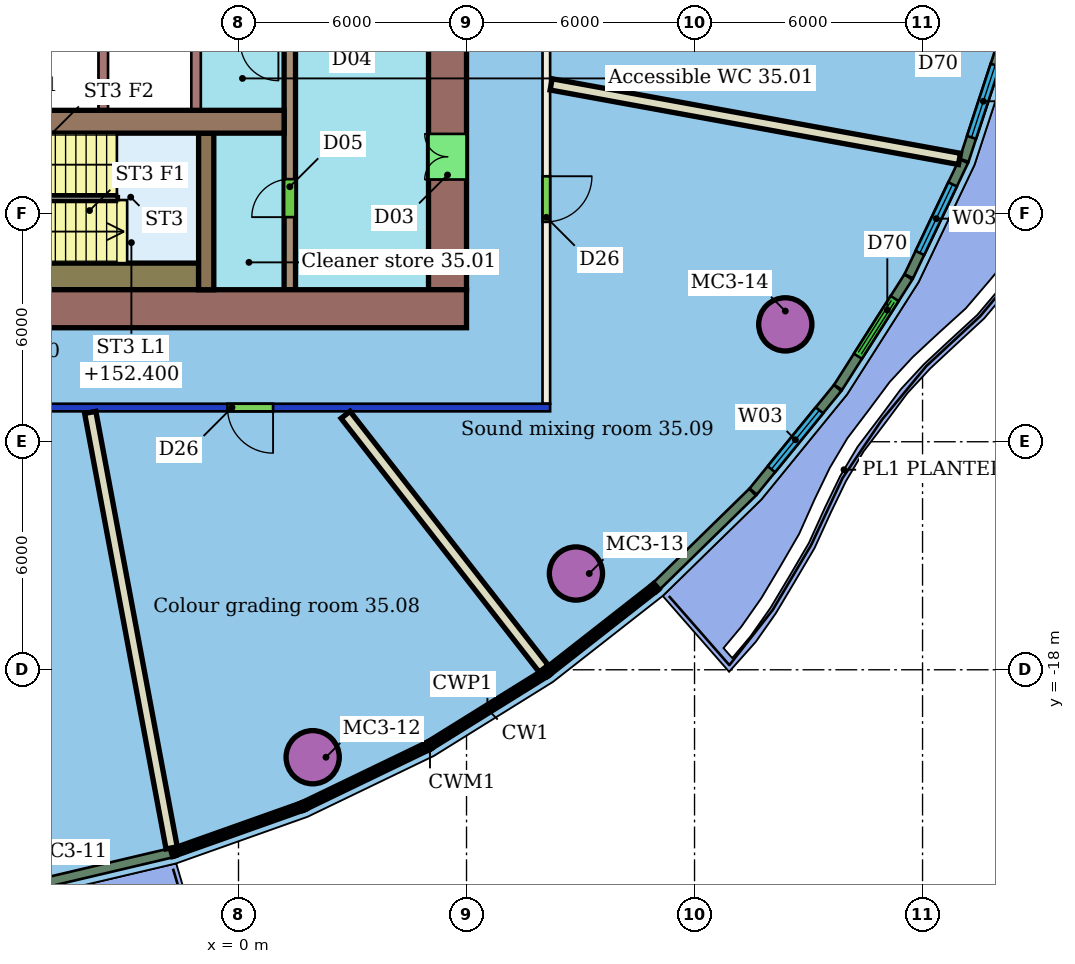
"""IFC4 building model, lengths in metres.
Left out: names, types, materials, properties, quantities, classifications, styles, units other than length and angle.
Written with IfcOpenShell. Run it as: python <this file> out.ifc"""

import sys

from ifc_helpers import new_model, si_unit, direction, frame, frame_2d, origin, origin_2d, place, context, subcontext, project, spatial, rectangle, hollow_circle, extrude, element, fill, save


model = new_model("IFC4")
c1 = context("Model", 3, precision=1e-05, world=origin(), true_north=direction((0.0, 1.0)))
c2 = subcontext(c1, "Body", "Model", "MODEL_VIEW")
j1 = project(units=[si_unit("LENGTHUNIT", "METRE"), si_unit("PLANEANGLEUNIT", "RADIAN")], contexts=[c1])
p1 = place(None, origin())
s1 = spatial("IfcSite", under=j1, at=p1, CompositionType="ELEMENT")
p2 = place(p1, origin())
s2 = spatial("IfcBuilding", under=s1, at=p2, CompositionType="ELEMENT")
p3 = place(p2, frame((0.0, 0.0, 150.6)))
s3 = spatial("IfcBuildingStorey", under=s2, at=p3, CompositionType="ELEMENT", Elevation=150.6)
for number, where, z_axis, x_axis in (
    (1, (1.952, -20.301, 0.0), (0.0, 0.0, 1.0), (1.0, 0.0, 0.0)),
    (2, (8.879, -15.467, 0.0), (0.0, 0.0, 1.0), (1.0, 0.0, 0.0)),
    (3, (14.388, -8.912, 0.0), (0.0, 0.0, 1.0), (1.0, 0.0, 0.0)),
):
    element("IfcColumn", number, at=place(p3, frame(where, z_axis=z_axis, x_axis=x_axis)), inside=s3, PredefinedType="COLUMN", context=c2, shape_type="SweptSolid", body=[
        extrude(hollow_circle(Radius=0.7, WallThickness=0.05, at=origin_2d()), origin(), (0.0, 0.0, 1.0), 3.45),
    ])
p4 = place(p3, frame((8.2, -11.1, 0.0), z_axis=(0.0, 0.0, 1.0), x_axis=(-1.0, 0.0, 0.0)))
e4 = element("IfcWall", 4, at=p4, inside=s3, PredefinedType="PARTITIONING", context=c2, shape_type="SweptSolid", body=[
    extrude(rectangle(XDim=28.4, YDim=0.2, at=frame_2d((14.2, 0.0))), origin(), (0.0, 0.0, 1.0), 3.05),
])
p5 = place(p4, frame((22.505, 0.0, 0.0)))
e5 = element("IfcOpeningElement", 5, at=p5, cuts=e4, PredefinedType="OPENING", context=c2, shape_type="SweptSolid", body=[
    extrude(rectangle(XDim=1.8, YDim=2.1, at=frame_2d((0.9, 1.05))), frame((0.0, 0.11, 0.0), z_axis=(0.0, -1.0, 0.0), x_axis=(1.0, 0.0, 0.0)), (0.0, 0.0, 1.0), 0.22),
])
p6 = place(p4, frame((17.127, 0.0, 0.0)))
e6 = element("IfcOpeningElement", 6, at=p6, cuts=e4, PredefinedType="OPENING", context=c2, shape_type="SweptSolid", body=[
    extrude(rectangle(XDim=0.9, YDim=2.1, at=frame_2d((0.45, 1.05))), frame((0.0, 0.11, 0.0), z_axis=(0.0, -1.0, 0.0), x_axis=(1.0, 0.0, 0.0)), (0.0, 0.0, 1.0), 0.22),
])
p7 = place(p4, frame((7.291, 0.0, 0.0)))
e7 = element("IfcOpeningElement", 7, at=p7, cuts=e4, PredefinedType="OPENING", context=c2, shape_type="SweptSolid", body=[
    extrude(rectangle(XDim=1.2, YDim=2.1, at=frame_2d((0.6, 1.05))), frame((0.0, 0.11, 0.0), z_axis=(0.0, -1.0, 0.0), x_axis=(1.0, 0.0, 0.0)), (0.0, 0.0, 1.0), 0.22),
])
p8 = place(p3, frame((8.1, 11.0, 0.0), z_axis=(0.0, 0.0, 1.0), x_axis=(0.0, -1.0, 0.0)))
e8 = element("IfcWall", 8, at=p8, inside=s3, PredefinedType="PARTITIONING", context=c2, shape_type="SweptSolid", body=[
    extrude(rectangle(XDim=22.0, YDim=0.2, at=frame_2d((11.0, 0.0))), origin(), (0.0, 0.0, 1.0), 3.45),
])
p9 = place(p8, frame((16.014, 0.0, 0.0)))
e9 = element("IfcOpeningElement", 9, at=p9, cuts=e8, PredefinedType="OPENING", context=c2, shape_type="SweptSolid", body=[
    extrude(rectangle(XDim=1.2, YDim=2.1, at=frame_2d((0.6, 1.05))), frame((0.0, 0.11, 0.0), z_axis=(0.0, -1.0, 0.0), x_axis=(1.0, 0.0, 0.0)), (0.0, 0.0, 1.0), 0.22),
])
p10 = place(p8, frame((8.381, 0.0, 0.0)))
e10 = element("IfcOpeningElement", 10, at=p10, cuts=e8, PredefinedType="OPENING", context=c2, shape_type="SweptSolid", body=[
    extrude(rectangle(XDim=1.8, YDim=2.1, at=frame_2d((0.9, 1.05))), frame((0.0, 0.11, 0.0), z_axis=(0.0, -1.0, 0.0), x_axis=(1.0, 0.0, 0.0)), (0.0, 0.0, 1.0), 0.22),
])
p11 = place(p3, frame((-1.759, -22.687, 0.0), z_axis=(0.0, 0.0, 1.0), x_axis=(-0.183744806011, 0.982973980461, 0.0)))
e11 = element("IfcWall", 11, at=p11, inside=s3, PredefinedType="PARTITIONING", context=c2, shape_type="SweptSolid", body=[
    extrude(rectangle(XDim=11.658, YDim=0.3, at=frame_2d((5.829, 0.0))), origin(), (0.0, 0.0, 1.0), 3.45),
])
p12 = place(p3, frame((8.031, -17.97, 0.0), z_axis=(0.0, 0.0, 1.0), x_axis=(-0.615415856826, 0.788202590181, 0.0)))
e12 = element("IfcWall", 12, at=p12, inside=s3, PredefinedType="PARTITIONING", context=c2, shape_type="SweptSolid", body=[
    extrude(rectangle(XDim=8.472, YDim=0.3, at=frame_2d((4.236, 0.0))), origin(), (0.0, 0.0, 1.0), 3.45),
])
p13 = place(p3, frame((18.972, -4.558, 0.0), z_axis=(0.0, 0.0, 1.0), x_axis=(-0.983747727231, 0.179556144892, 0.0)))
e13 = element("IfcWall", 13, at=p13, inside=s3, PredefinedType="PARTITIONING", context=c2, shape_type="SweptSolid", body=[
    extrude(rectangle(XDim=10.922, YDim=0.3, at=frame_2d((5.461, 0.0))), origin(), (0.0, 0.0, 1.0), 3.45),
])
p14 = place(p3, frame((-5.213, -23.629, 0.0), z_axis=(0.0, 0.0, 1.0), x_axis=(0.973349080419, 0.229328514683, 0.0)))
e14 = element("IfcWall", 14, at=p14, inside=s3, PredefinedType="SOLIDWALL", context=c2, shape_type="SweptSolid", body=[
    extrude(rectangle(XDim=3.529, YDim=0.25, at=frame_2d((1.765, 0.0))), origin(), (0.0, 0.0, 1.0), 3.1),
])
p15 = place(p3, frame((11.005, -15.792, 0.0), z_axis=(0.0, 0.0, 1.0), x_axis=(0.715154193922, 0.698966722324, 0.0)))
e15 = element("IfcWall", 15, at=p15, inside=s3, PredefinedType="SOLIDWALL", context=c2, shape_type="SweptSolid", body=[
    extrude(rectangle(XDim=3.529, YDim=0.25, at=frame_2d((1.765, 0.0))), origin(), (0.0, 0.0, 1.0), 3.1),
])
p16 = place(p3, frame((13.543, -13.31, 0.0), z_axis=(0.0, 0.0, 1.0), x_axis=(0.631962066668, 0.774999320188, 0.0)))
e16 = element("IfcWall", 16, at=p16, inside=s3, PredefinedType="SOLIDWALL", context=c2, shape_type="SweptSolid", body=[
    extrude(rectangle(XDim=3.514, YDim=0.25, at=frame_2d((1.757, 0.0))), origin(), (0.0, 0.0, 1.0), 3.1),
])
p17 = place(p16, frame((0.757, 0.0, 0.9)))
e17 = element("IfcOpeningElement", 17, at=p17, cuts=e16, PredefinedType="OPENING", context=c2, shape_type="SweptSolid", body=[
    extrude(rectangle(XDim=2.0, YDim=2.1, at=frame_2d((1.0, 1.05))), frame((0.0, 0.135, 0.0), z_axis=(0.0, -1.0, 0.0), x_axis=(1.0, 0.0, 0.0)), (0.0, 0.0, 1.0), 0.27),
])
p18 = place(p3, frame((15.778, -10.568, 0.0), z_axis=(0.0, 0.0, 1.0), x_axis=(0.537256497047, 0.843418909191, 0.0)))
e18 = element("IfcWall", 18, at=p18, inside=s3, PredefinedType="SOLIDWALL", context=c2, shape_type="SweptSolid", body=[
    extrude(rectangle(XDim=3.441, YDim=0.25, at=frame_2d((1.72, 0.0))), origin(), (0.0, 0.0, 1.0), 3.1),
])
p19 = place(p18, frame((0.97, 0.0, 0.0)))
e19 = element("IfcOpeningElement", 19, at=p19, cuts=e18, PredefinedType="OPENING", context=c2, shape_type="SweptSolid", body=[
    extrude(rectangle(XDim=1.8, YDim=2.4, at=frame_2d((0.9, 1.2))), frame((0.0, 0.135, 0.0), z_axis=(0.0, -1.0, 0.0), x_axis=(1.0, 0.0, 0.0)), (0.0, 0.0, 1.0), 0.27),
])
p20 = place(p3, frame((17.638, -7.645, 0.0), z_axis=(0.0, 0.0, 1.0), x_axis=(0.430495314567, 0.902592811923, 0.0)))
e20 = element("IfcWall", 20, at=p20, inside=s3, PredefinedType="SOLIDWALL", context=c2, shape_type="SweptSolid", body=[
    extrude(rectangle(XDim=3.357, YDim=0.25, at=frame_2d((1.678, 0.0))), origin(), (0.0, 0.0, 1.0), 3.1),
])
p21 = place(p20, frame((0.678, 0.0, 0.9)))
e21 = element("IfcOpeningElement", 21, at=p21, cuts=e20, PredefinedType="OPENING", context=c2, shape_type="SweptSolid", body=[
    extrude(rectangle(XDim=2.0, YDim=2.1, at=frame_2d((1.0, 1.05))), frame((0.0, 0.135, 0.0), z_axis=(0.0, -1.0, 0.0), x_axis=(1.0, 0.0, 0.0)), (0.0, 0.0, 1.0), 0.27),
])
p22 = place(p3, frame((19.092, -4.593, 0.0), z_axis=(0.0, 0.0, 1.0), x_axis=(0.311426794422, 0.950270146704, 0.0)))
e22 = element("IfcWall", 22, at=p22, inside=s3, PredefinedType="SOLIDWALL", context=c2, shape_type="SweptSolid", body=[
    extrude(rectangle(XDim=3.268, YDim=0.25, at=frame_2d((1.634, 0.0))), origin(), (0.0, 0.0, 1.0), 3.1),
])
p23 = place(p22, frame((0.634, 0.0, 0.9)))
e23 = element("IfcOpeningElement", 23, at=p23, cuts=e22, PredefinedType="OPENING", context=c2, shape_type="SweptSolid", body=[
    extrude(rectangle(XDim=2.0, YDim=2.1, at=frame_2d((1.0, 1.05))), frame((0.0, 0.135, 0.0), z_axis=(0.0, -1.0, 0.0), x_axis=(1.0, 0.0, 0.0)), (0.0, 0.0, 1.0), 0.27),
])
p24 = place(p3, frame((-18.0, -8.5, 0.0), z_axis=(0.0, 0.0, 1.0), x_axis=(1.0, 0.0, 0.0)))
e24 = element("IfcWall", 24, at=p24, inside=s3, PredefinedType="SHEAR", context=c2, shape_type="SweptSolid", body=[
    extrude(rectangle(XDim=24.0, YDim=1.0, at=frame_2d((12.0, 0.0))), origin(), (0.0, 0.0, 1.0), 3.3),
])
p25 = place(p24, frame((6.0, 0.0, 0.0)))
e25 = element("IfcOpeningElement", 25, at=p25, cuts=e24, PredefinedType="OPENING", context=c2, shape_type="SweptSolid", body=[
    extrude(rectangle(XDim=1.2, YDim=2.1, at=frame_2d((0.6, 1.05))), frame((0.0, 0.51, 0.0), z_axis=(0.0, -1.0, 0.0), x_axis=(1.0, 0.0, 0.0)), (0.0, 0.0, 1.0), 1.02),
])
p26 = place(p3, frame((5.5, -8.0, 0.0), z_axis=(0.0, 0.0, 1.0), x_axis=(0.0, 1.0, 0.0)))
e26 = element("IfcWall", 26, at=p26, inside=s3, PredefinedType="SHEAR", context=c2, shape_type="SweptSolid", body=[
    extrude(rectangle(XDim=16.0, YDim=1.0, at=frame_2d((8.0, 0.0))), origin(), (0.0, 0.0, 1.0), 3.3),
])
p27 = place(p26, frame((2.9, 0.0, 0.0)))
e27 = element("IfcOpeningElement", 27, at=p27, cuts=e26, PredefinedType="OPENING", context=c2, shape_type="SweptSolid", body=[
    extrude(rectangle(XDim=1.2, YDim=2.1, at=frame_2d((0.6, 1.05))), frame((0.0, 0.51, 0.0), z_axis=(0.0, -1.0, 0.0), x_axis=(1.0, 0.0, 0.0)), (0.0, 0.0, 1.0), 1.02),
])
p28 = place(p26, frame((11.9, 0.0, 0.0)))
e28 = element("IfcOpeningElement", 28, at=p28, cuts=e26, PredefinedType="OPENING", context=c2, shape_type="SweptSolid", body=[
    extrude(rectangle(XDim=1.2, YDim=2.1, at=frame_2d((0.6, 1.05))), frame((0.0, 0.51, 0.0), z_axis=(0.0, -1.0, 0.0), x_axis=(1.0, 0.0, 0.0)), (0.0, 0.0, 1.0), 1.02),
])
p29 = place(p3, frame((-6.0, -3.58, 0.0), z_axis=(0.0, 0.0, 1.0), x_axis=(1.0, 0.0, 0.0)))
e29 = element("IfcWall", 29, at=p29, inside=s3, PredefinedType="SHEAR", context=c2, shape_type="SweptSolid", body=[
    extrude(rectangle(XDim=7.2, YDim=0.6, at=frame_2d((3.6, 0.0))), origin(), (0.0, 0.0, 1.0), 3.3),
])
p30 = place(p3, frame((1.35, -8.0, 0.0), z_axis=(0.0, 0.0, 1.0), x_axis=(0.0, 1.0, 0.0)))
e30 = element("IfcWall", 30, at=p30, inside=s3, PredefinedType="SHEAR", context=c2, shape_type="SweptSolid", body=[
    extrude(rectangle(XDim=16.0, YDim=0.3, at=frame_2d((8.0, 0.0))), origin(), (0.0, 0.0, 1.0), 3.3),
])
p31 = place(p30, frame((1.91, 0.0, 0.0)))
e31 = element("IfcOpeningElement", 31, at=p31, cuts=e30, PredefinedType="OPENING", context=c2, shape_type="SweptSolid", body=[
    extrude(rectangle(XDim=1.0, YDim=2.1, at=frame_2d((0.5, 1.05))), frame((0.0, 0.16, 0.0), z_axis=(0.0, -1.0, 0.0), x_axis=(1.0, 0.0, 0.0)), (0.0, 0.0, 1.0), 0.32),
])
p32 = place(p30, frame((7.25, 0.0, 0.0)))
e32 = element("IfcOpeningElement", 32, at=p32, cuts=e30, PredefinedType="OPENING", context=c2, shape_type="SweptSolid", body=[
    extrude(rectangle(XDim=1.5, YDim=2.1, at=frame_2d((0.75, 1.05))), frame((0.0, 0.16, 0.0), z_axis=(0.0, -1.0, 0.0), x_axis=(1.0, 0.0, 0.0)), (0.0, 0.0, 1.0), 0.32),
])
p33 = place(p3, frame((-0.85, -3.88, 0.0), z_axis=(0.0, 0.0, 1.0), x_axis=(0.0, -1.0, 0.0)))
e33 = element("IfcWall", 33, at=p33, inside=s3, PredefinedType="SHEAR", context=c2, shape_type="SweptSolid", body=[
    extrude(rectangle(XDim=4.12, YDim=0.4, at=frame_2d((2.06, 0.0))), origin(), (0.0, 0.0, 1.0), 3.3),
])
p34 = place(p3, frame((-8.1, -7.65, 0.0), z_axis=(0.0, 0.0, 1.0), x_axis=(1.0, 0.0, 0.0)))
e34 = element("IfcWall", 34, at=p34, inside=s3, PredefinedType="SHEAR", context=c2, shape_type="SweptSolid", body=[
    extrude(rectangle(XDim=7.05, YDim=0.7, at=frame_2d((3.525, 0.0))), origin(), (0.0, 0.0, 1.0), 3.3),
])
for number, where, z_axis, x_axis in (
    (35, (-3.558, -1.6, 0.0), (0.0, 0.0, 1.0), (0.0, -1.0, 0.0)),
    (36, (-1.117, -1.6, 0.0), (0.0, 0.0, 1.0), (0.0, -1.0, 0.0)),
):
    element("IfcWall", number, at=place(p3, frame(where, z_axis=z_axis, x_axis=x_axis)), inside=s3, PredefinedType="SHEAR", context=c2, shape_type="SweptSolid", body=[
        extrude(rectangle(XDim=1.68, YDim=0.25, at=frame_2d((0.84, 0.0))), origin(), (0.0, 0.0, 1.0), 3.3),
    ])
p35 = place(p7, origin())
e37 = element("IfcDoor", 37, at=p35, inside=s3, OperationType="SINGLE_SWING_LEFT", PredefinedType="DOOR", context=c2, shape_type="SweptSolid", body=[
    extrude(rectangle(XDim=1.2, YDim=2.1, at=frame_2d((0.6, 1.05))), frame((0.0, 0.025, 0.0), z_axis=(0.0, -1.0, 0.0), x_axis=(1.0, 0.0, 0.0)), (0.0, 0.0, 1.0), 0.05),
])
fill(e7, e37)
p36 = place(p9, origin())
e38 = element("IfcDoor", 38, at=p36, inside=s3, OperationType="SINGLE_SWING_LEFT", PredefinedType="DOOR", context=c2, shape_type="SweptSolid", body=[
    extrude(rectangle(XDim=1.2, YDim=2.1, at=frame_2d((0.6, 1.05))), frame((0.0, 0.025, 0.0), z_axis=(0.0, -1.0, 0.0), x_axis=(1.0, 0.0, 0.0)), (0.0, 0.0, 1.0), 0.05),
])
fill(e9, e38)
p37 = place(p17, origin())
e39 = element("IfcWindow", 39, at=p37, inside=s3, PartitioningType="SINGLE_PANEL", PredefinedType="WINDOW", context=c2, shape_type="SweptSolid", body=[
    extrude(rectangle(XDim=2.0, YDim=2.1, at=frame_2d((1.0, 1.05))), frame((0.0, 0.03, 0.0), z_axis=(0.0, -1.0, 0.0), x_axis=(1.0, 0.0, 0.0)), (0.0, 0.0, 1.0), 0.06),
])
fill(e17, e39)
p38 = place(p19, origin())
e40 = element("IfcDoor", 40, at=p38, inside=s3, OperationType="DOUBLE_DOOR_SLIDING", PredefinedType="DOOR", context=c2, shape_type="SweptSolid", body=[
    extrude(rectangle(XDim=1.8, YDim=2.4, at=frame_2d((0.9, 1.2))), frame((0.0, 0.025, 0.0), z_axis=(0.0, -1.0, 0.0), x_axis=(1.0, 0.0, 0.0)), (0.0, 0.0, 1.0), 0.05),
])
fill(e19, e40)
p39 = place(p21, origin())
e41 = element("IfcWindow", 41, at=p39, inside=s3, PartitioningType="SINGLE_PANEL", PredefinedType="WINDOW", context=c2, shape_type="SweptSolid", body=[
    extrude(rectangle(XDim=2.0, YDim=2.1, at=frame_2d((1.0, 1.05))), frame((0.0, 0.03, 0.0), z_axis=(0.0, -1.0, 0.0), x_axis=(1.0, 0.0, 0.0)), (0.0, 0.0, 1.0), 0.06),
])
fill(e21, e41)
p40 = place(p23, origin())
e42 = element("IfcWindow", 42, at=p40, inside=s3, PartitioningType="SINGLE_PANEL", PredefinedType="WINDOW", context=c2, shape_type="SweptSolid", body=[
    extrude(rectangle(XDim=2.0, YDim=2.1, at=frame_2d((1.0, 1.05))), frame((0.0, 0.03, 0.0), z_axis=(0.0, -1.0, 0.0), x_axis=(1.0, 0.0, 0.0)), (0.0, 0.0, 1.0), 0.06),
])
fill(e23, e42)
p41 = place(p27, origin())
e43 = element("IfcDoor", 43, at=p41, inside=s3, OperationType="DOUBLE_DOOR_SINGLE_SWING", PredefinedType="NOTDEFINED", context=c2, shape_type="SweptSolid", body=[
    extrude(rectangle(XDim=1.2, YDim=2.1, at=frame_2d((0.6, 1.05))), frame((0.0, 0.025, 0.0), z_axis=(0.0, -1.0, 0.0), x_axis=(1.0, 0.0, 0.0)), (0.0, 0.0, 1.0), 0.05),
])
fill(e27, e43)
p42 = place(p31, origin())
e44 = element("IfcDoor", 44, at=p42, inside=s3, OperationType="SINGLE_SWING_LEFT", PredefinedType="NOTDEFINED", context=c2, shape_type="SweptSolid", body=[
    extrude(rectangle(XDim=1.0, YDim=2.1, at=frame_2d((0.5, 1.05))), frame((0.0, 0.025, 0.0), z_axis=(0.0, -1.0, 0.0), x_axis=(1.0, 0.0, 0.0)), (0.0, 0.0, 1.0), 0.05),
])
fill(e31, e44)
save(model, sys.argv[1])
